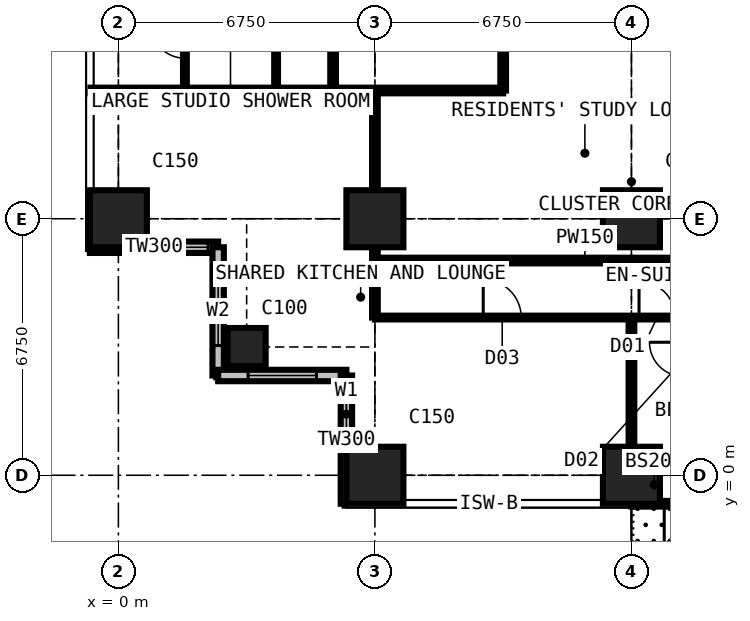
"""IFC4 building model, lengths in metres.
Left out: names, types, materials, properties, quantities, classifications, styles, units other than length and angle.
Written with IfcOpenShell. Run it as: python <this file> out.ifc"""

import sys

from ifc_helpers import new_model, si_unit, direction, frame, frame_2d, origin, origin_2d, place, context, subcontext, project, spatial, rectangle, extrude, element, fill, save


model = new_model("IFC4")
c1 = context("Model", 3, precision=1e-05, world=origin(), true_north=direction((0.0, 1.0)))
c2 = subcontext(c1, "Body", "Model", "MODEL_VIEW")
j1 = project(units=[si_unit("LENGTHUNIT", "METRE"), si_unit("PLANEANGLEUNIT", "RADIAN")], contexts=[c1])
p1 = place(None, origin())
s1 = spatial("IfcSite", under=j1, at=p1, CompositionType="ELEMENT")
p2 = place(p1, origin())
s2 = spatial("IfcBuilding", under=s1, at=p2, CompositionType="ELEMENT")
p3 = place(p2, frame((0.0, 0.0, 123.3)))
s3 = spatial("IfcBuildingStorey", under=s2, at=p3, CompositionType="ELEMENT", Elevation=123.3)
p4 = place(p3, frame((0.0, 6.75, 0.0), z_axis=(0.0, 0.0, 1.0), x_axis=(1.0, 0.0, 0.0)))
e1 = element("IfcColumn", 1, at=p4, inside=s3, PredefinedType="COLUMN", context=c2, shape_type="SweptSolid", body=[
    extrude(rectangle(XDim=1.5, YDim=1.5, at=origin_2d()), origin(), (0.0, 0.0, 1.0), 3.6),
])
p5 = place(p3, frame((3.375, 3.375, 0.0), z_axis=(0.0, 0.0, 1.0), x_axis=(1.0, 0.0, 0.0)))
e2 = element("IfcColumn", 2, at=p5, inside=s3, PredefinedType="COLUMN", context=c2, shape_type="SweptSolid", body=[
    extrude(rectangle(XDim=1.0, YDim=1.0, at=origin_2d()), origin(), (0.0, 0.0, 1.0), 3.6),
])
for number, where, z_axis, x_axis in (
    (3, (6.75, 0.0, 0.0), (0.0, 0.0, 1.0), (1.0, 0.0, 0.0)),
    (4, (6.75, 6.75, 0.0), (0.0, 0.0, 1.0), (1.0, 0.0, 0.0)),
    (5, (13.5, 0.0, 0.0), (0.0, 0.0, 1.0), (1.0, 0.0, 0.0)),
    (6, (13.5, 6.75, 0.0), (0.0, 0.0, 1.0), (1.0, 0.0, 0.0)),
):
    element("IfcColumn", number, at=place(p3, frame(where, z_axis=z_axis, x_axis=x_axis)), inside=s3, PredefinedType="COLUMN", context=c2, shape_type="SweptSolid", body=[
        extrude(rectangle(XDim=1.5, YDim=1.5, at=origin_2d()), origin(), (0.0, 0.0, 1.0), 3.6),
    ])
p6 = place(p3, frame((-0.75, 6.0, 0.0), z_axis=(0.0, 0.0, 1.0), x_axis=(1.0, 0.0, 0.0)))
e7 = element("IfcWall", 7, at=p6, inside=s3, PredefinedType="SOLIDWALL", context=c2, shape_type="SweptSolid", body=[
    extrude(rectangle(XDim=3.375, YDim=0.3, at=frame_2d((1.688, 0.0))), origin(), (0.0, 0.0, 1.0), 3.375),
])
p7 = place(p6, frame((1.607, 0.0, 0.9)))
e8 = element("IfcOpeningElement", 8, at=p7, cuts=e7, PredefinedType="OPENING", context=c2, shape_type="SweptSolid", body=[
    extrude(rectangle(XDim=1.5, YDim=1.8, at=frame_2d((0.75, 0.9))), frame((0.0, 0.16, 0.0), z_axis=(0.0, -1.0, 0.0), x_axis=(1.0, 0.0, 0.0)), (0.0, 0.0, 1.0), 0.32),
])
p8 = place(p3, frame((2.625, 6.0, 0.0), z_axis=(0.0, 0.0, 1.0), x_axis=(0.0, -1.0, 0.0)))
e9 = element("IfcWall", 9, at=p8, inside=s3, PredefinedType="SOLIDWALL", context=c2, shape_type="SweptSolid", body=[
    extrude(rectangle(XDim=3.375, YDim=0.3, at=frame_2d((1.688, 0.0))), origin(), (0.0, 0.0, 1.0), 3.375),
])
p9 = place(p8, frame((0.788, 0.0, 0.6)))
e10 = element("IfcOpeningElement", 10, at=p9, cuts=e9, PredefinedType="OPENING", context=c2, shape_type="SweptSolid", body=[
    extrude(rectangle(XDim=1.8, YDim=2.1, at=frame_2d((0.9, 1.05))), frame((0.0, 0.16, 0.0), z_axis=(0.0, -1.0, 0.0), x_axis=(1.0, 0.0, 0.0)), (0.0, 0.0, 1.0), 0.32),
])
p10 = place(p3, frame((2.625, 2.625, 0.0), z_axis=(0.0, 0.0, 1.0), x_axis=(1.0, 0.0, 0.0)))
e11 = element("IfcWall", 11, at=p10, inside=s3, PredefinedType="SOLIDWALL", context=c2, shape_type="SweptSolid", body=[
    extrude(rectangle(XDim=3.375, YDim=0.3, at=frame_2d((1.688, 0.0))), origin(), (0.0, 0.0, 1.0), 3.375),
])
p11 = place(p10, frame((0.788, 0.0, 0.6)))
e12 = element("IfcOpeningElement", 12, at=p11, cuts=e11, PredefinedType="OPENING", context=c2, shape_type="SweptSolid", body=[
    extrude(rectangle(XDim=1.8, YDim=2.1, at=frame_2d((0.9, 1.05))), frame((0.0, 0.16, 0.0), z_axis=(0.0, -1.0, 0.0), x_axis=(1.0, 0.0, 0.0)), (0.0, 0.0, 1.0), 0.32),
])
p12 = place(p3, frame((6.0, 2.625, 0.0), z_axis=(0.0, 0.0, 1.0), x_axis=(0.0, -1.0, 0.0)))
e13 = element("IfcWall", 13, at=p12, inside=s3, PredefinedType="SOLIDWALL", context=c2, shape_type="SweptSolid", body=[
    extrude(rectangle(XDim=3.375, YDim=0.3, at=frame_2d((1.688, 0.0))), origin(), (0.0, 0.0, 1.0), 3.375),
])
p13 = place(p12, frame((0.268, 0.0, 0.9)))
e14 = element("IfcOpeningElement", 14, at=p13, cuts=e13, PredefinedType="OPENING", context=c2, shape_type="SweptSolid", body=[
    extrude(rectangle(XDim=1.5, YDim=1.8, at=frame_2d((0.75, 0.9))), frame((0.0, 0.16, 0.0), z_axis=(0.0, -1.0, 0.0), x_axis=(1.0, 0.0, 0.0)), (0.0, 0.0, 1.0), 0.32),
])
p14 = place(p3, frame((20.25, -0.75, 0.0), z_axis=(0.0, 0.0, 1.0), x_axis=(-1.0, 0.0, 0.0)))
e15 = element("IfcWall", 15, at=p14, inside=s3, PredefinedType="SOLIDWALL", context=c2, shape_type="SweptSolid", body=[
    extrude(rectangle(XDim=6.75, YDim=0.15, at=frame_2d((3.375, 0.0))), origin(), (0.0, 0.0, 1.0), 3.375),
])
p15 = place(p14, frame((0.863, 0.0, 0.0)))
e16 = element("IfcOpeningElement", 16, at=p15, cuts=e15, PredefinedType="OPENING", context=c2, shape_type="SweptSolid", body=[
    extrude(rectangle(XDim=1.0, YDim=2.2, at=frame_2d((0.5, 1.1))), frame((0.0, 0.085, 0.0), z_axis=(0.0, -1.0, 0.0), x_axis=(1.0, 0.0, 0.0)), (0.0, 0.0, 1.0), 0.17),
])
p16 = place(p14, frame((1.975, 0.0, 0.9)))
e17 = element("IfcOpeningElement", 17, at=p16, cuts=e15, PredefinedType="OPENING", context=c2, shape_type="SweptSolid", body=[
    extrude(rectangle(XDim=1.2, YDim=1.8, at=frame_2d((0.6, 0.9))), frame((0.0, 0.085, 0.0), z_axis=(0.0, -1.0, 0.0), x_axis=(1.0, 0.0, 0.0)), (0.0, 0.0, 1.0), 0.17),
])
p17 = place(p14, frame((4.887, 0.0, 0.0)))
e18 = element("IfcOpeningElement", 18, at=p17, cuts=e15, PredefinedType="OPENING", context=c2, shape_type="SweptSolid", body=[
    extrude(rectangle(XDim=1.0, YDim=2.2, at=frame_2d((0.5, 1.1))), frame((0.0, 0.085, 0.0), z_axis=(0.0, -1.0, 0.0), x_axis=(1.0, 0.0, 0.0)), (0.0, 0.0, 1.0), 0.17),
])
p18 = place(p14, frame((3.575, 0.0, 0.9)))
e19 = element("IfcOpeningElement", 19, at=p18, cuts=e15, PredefinedType="OPENING", context=c2, shape_type="SweptSolid", body=[
    extrude(rectangle(XDim=1.2, YDim=1.8, at=frame_2d((0.6, 0.9))), frame((0.0, 0.085, 0.0), z_axis=(0.0, -1.0, 0.0), x_axis=(1.0, 0.0, 0.0)), (0.0, 0.0, 1.0), 0.17),
])
p19 = place(p3, frame((-0.734, 10.125, 0.0), z_axis=(0.0, 0.0, 1.0), x_axis=(1.0, 0.0, 0.0)))
e20 = element("IfcWall", 20, at=p19, inside=s3, PredefinedType="PARTITIONING", context=c2, shape_type="SweptSolid", body=[
    extrude(rectangle(XDim=10.859, YDim=0.15, at=frame_2d((5.429, 0.0))), origin(), (0.0, 0.0, 1.0), 3.375),
])
p20 = place(p3, frame((1.75, 10.125, 0.0), z_axis=(0.0, 0.0, 1.0), x_axis=(0.0, 1.0, 0.0)))
e21 = element("IfcWall", 21, at=p20, inside=s3, PredefinedType="PARTITIONING", context=c2, shape_type="SweptSolid", body=[
    extrude(rectangle(XDim=2.6, YDim=0.1, at=frame_2d((1.3, 0.0))), origin(), (0.0, 0.0, 1.0), 3.375),
])
p21 = place(p20, frame((0.85, 0.0, 0.0)))
e22 = element("IfcOpeningElement", 22, at=p21, cuts=e21, PredefinedType="OPENING", context=c2, shape_type="SweptSolid", body=[
    extrude(rectangle(XDim=0.9, YDim=2.2, at=frame_2d((0.45, 1.1))), frame((0.0, 0.06, 0.0), z_axis=(0.0, -1.0, 0.0), x_axis=(1.0, 0.0, 0.0)), (0.0, 0.0, 1.0), 0.12),
])
p22 = place(p3, frame((4.15, 10.125, 0.0), z_axis=(0.0, 0.0, 1.0), x_axis=(0.0, 1.0, 0.0)))
e23 = element("IfcWall", 23, at=p22, inside=s3, PredefinedType="PARTITIONING", context=c2, shape_type="SweptSolid", body=[
    extrude(rectangle(XDim=16.875, YDim=0.1, at=frame_2d((8.438, 0.0))), origin(), (0.0, 0.0, 1.0), 3.375),
])
p23 = place(p22, frame((4.2, 0.0, 0.0)))
e24 = element("IfcOpeningElement", 24, at=p23, cuts=e23, PredefinedType="OPENING", context=c2, shape_type="SweptSolid", body=[
    extrude(rectangle(XDim=0.95, YDim=2.2, at=frame_2d((0.475, 1.1))), frame((0.0, 0.06, 0.0), z_axis=(0.0, -1.0, 0.0), x_axis=(1.0, 0.0, 0.0)), (0.0, 0.0, 1.0), 0.12),
])
p24 = place(p22, frame((10.95, 0.0, 0.0)))
e25 = element("IfcOpeningElement", 25, at=p24, cuts=e23, PredefinedType="OPENING", context=c2, shape_type="SweptSolid", body=[
    extrude(rectangle(XDim=0.95, YDim=2.2, at=frame_2d((0.475, 1.1))), frame((0.0, 0.06, 0.0), z_axis=(0.0, -1.0, 0.0), x_axis=(1.0, 0.0, 0.0)), (0.0, 0.0, 1.0), 0.12),
])
p25 = place(p3, frame((5.65, 10.125, 0.0), z_axis=(0.0, 0.0, 1.0), x_axis=(0.0, 1.0, 0.0)))
e26 = element("IfcWall", 26, at=p25, inside=s3, PredefinedType="PARTITIONING", context=c2, shape_type="SweptSolid", body=[
    extrude(rectangle(XDim=10.762, YDim=0.15, at=frame_2d((5.381, 0.0))), origin(), (0.0, 0.0, 1.0), 3.375),
])
p26 = place(p25, frame((4.9, 0.0, 0.0)))
e27 = element("IfcOpeningElement", 27, at=p26, cuts=e26, PredefinedType="OPENING", context=c2, shape_type="SweptSolid", body=[
    extrude(rectangle(XDim=0.95, YDim=2.2, at=frame_2d((0.475, 1.1))), frame((0.0, 0.085, 0.0), z_axis=(0.0, -1.0, 0.0), x_axis=(1.0, 0.0, 0.0)), (0.0, 0.0, 1.0), 0.17),
])
p27 = place(p3, frame((6.75, 4.15, 0.0), z_axis=(0.0, 0.0, 1.0), x_axis=(0.0, 1.0, 0.0)))
e28 = element("IfcWall", 28, at=p27, inside=s3, PredefinedType="PARTITIONING", context=c2, shape_type="SweptSolid", body=[
    extrude(rectangle(XDim=5.975, YDim=0.15, at=frame_2d((2.988, 0.0))), origin(), (0.0, 0.0, 1.0), 2.877),
])
p28 = place(p3, frame((6.75, 4.15, 0.0), z_axis=(0.0, 0.0, 1.0), x_axis=(1.0, 0.0, 0.0)))
e29 = element("IfcWall", 29, at=p28, inside=s3, PredefinedType="PARTITIONING", context=c2, shape_type="SweptSolid", body=[
    extrude(rectangle(XDim=23.625, YDim=0.1, at=frame_2d((11.812, 0.0))), origin(), (0.0, 0.0, 1.0), 3.375),
])
p29 = place(p28, frame((2.85, 0.0, 0.0)))
e30 = element("IfcOpeningElement", 30, at=p29, cuts=e29, PredefinedType="OPENING", context=c2, shape_type="SweptSolid", body=[
    extrude(rectangle(XDim=1.0, YDim=2.2, at=frame_2d((0.5, 1.1))), frame((0.0, 0.06, 0.0), z_axis=(0.0, -1.0, 0.0), x_axis=(1.0, 0.0, 0.0)), (0.0, 0.0, 1.0), 0.12),
])
p30 = place(p28, frame((6.95, 0.0, 0.0)))
e31 = element("IfcOpeningElement", 31, at=p30, cuts=e29, PredefinedType="OPENING", context=c2, shape_type="SweptSolid", body=[
    extrude(rectangle(XDim=0.95, YDim=2.2, at=frame_2d((0.475, 1.1))), frame((0.0, 0.06, 0.0), z_axis=(0.0, -1.0, 0.0), x_axis=(1.0, 0.0, 0.0)), (0.0, 0.0, 1.0), 0.12),
])
p31 = place(p28, frame((10.375, 0.0, 0.0)))
e32 = element("IfcOpeningElement", 32, at=p31, cuts=e29, PredefinedType="OPENING", context=c2, shape_type="SweptSolid", body=[
    extrude(rectangle(XDim=0.95, YDim=2.2, at=frame_2d((0.475, 1.1))), frame((0.0, 0.06, 0.0), z_axis=(0.0, -1.0, 0.0), x_axis=(1.0, 0.0, 0.0)), (0.0, 0.0, 1.0), 0.12),
])
p32 = place(p28, frame((13.7, 0.0, 0.0)))
e33 = element("IfcOpeningElement", 33, at=p32, cuts=e29, PredefinedType="OPENING", context=c2, shape_type="SweptSolid", body=[
    extrude(rectangle(XDim=0.95, YDim=2.2, at=frame_2d((0.475, 1.1))), frame((0.0, 0.06, 0.0), z_axis=(0.0, -1.0, 0.0), x_axis=(1.0, 0.0, 0.0)), (0.0, 0.0, 1.0), 0.12),
])
p33 = place(p28, frame((17.125, 0.0, 0.0)))
e34 = element("IfcOpeningElement", 34, at=p33, cuts=e29, PredefinedType="OPENING", context=c2, shape_type="SweptSolid", body=[
    extrude(rectangle(XDim=0.95, YDim=2.2, at=frame_2d((0.475, 1.1))), frame((0.0, 0.06, 0.0), z_axis=(0.0, -1.0, 0.0), x_axis=(1.0, 0.0, 0.0)), (0.0, 0.0, 1.0), 0.12),
])
p34 = place(p28, frame((20.5, 0.0, 0.0)))
e35 = element("IfcOpeningElement", 35, at=p34, cuts=e29, PredefinedType="OPENING", context=c2, shape_type="SweptSolid", body=[
    extrude(rectangle(XDim=0.95, YDim=2.2, at=frame_2d((0.475, 1.1))), frame((0.0, 0.06, 0.0), z_axis=(0.0, -1.0, 0.0), x_axis=(1.0, 0.0, 0.0)), (0.0, 0.0, 1.0), 0.12),
])
p35 = place(p3, frame((6.75, 5.65, 0.0), z_axis=(0.0, 0.0, 1.0), x_axis=(1.0, 0.0, 0.0)))
e36 = element("IfcWall", 36, at=p35, inside=s3, PredefinedType="PARTITIONING", context=c2, shape_type="SweptSolid", body=[
    extrude(rectangle(XDim=11.05, YDim=0.15, at=frame_2d((5.525, 0.0))), origin(), (0.0, 0.0, 1.0), 3.375),
])
p36 = place(p3, frame((10.125, 10.125, 0.0), z_axis=(0.0, 0.0, 1.0), x_axis=(0.0, 1.0, 0.0)))
e37 = element("IfcWall", 37, at=p36, inside=s3, PredefinedType="PARTITIONING", context=c2, shape_type="SweptSolid", body=[
    extrude(rectangle(XDim=1.175, YDim=0.15, at=frame_2d((0.587, 0.0))), origin(), (0.0, 0.0, 1.0), 3.375),
])
p37 = place(p3, frame((13.5, -0.734, 0.0), z_axis=(0.0, 0.0, 1.0), x_axis=(0.0, 1.0, 0.0)))
e38 = element("IfcWall", 38, at=p37, inside=s3, PredefinedType="PARTITIONING", context=c2, shape_type="SweptSolid", body=[
    extrude(rectangle(XDim=4.884, YDim=0.15, at=frame_2d((2.442, 0.0))), origin(), (0.0, 0.0, 1.0), 2.877),
])
p38 = place(p7, origin())
e39 = element("IfcWindow", 39, at=p38, inside=s3, PartitioningType="SINGLE_PANEL", PredefinedType="WINDOW", context=c2, shape_type="SweptSolid", body=[
    extrude(rectangle(XDim=1.5, YDim=1.8, at=frame_2d((0.75, 0.9))), frame((0.0, 0.03, 0.0), z_axis=(0.0, -1.0, 0.0), x_axis=(1.0, 0.0, 0.0)), (0.0, 0.0, 1.0), 0.06),
])
fill(e8, e39)
p39 = place(p9, origin())
e40 = element("IfcWindow", 40, at=p39, inside=s3, PartitioningType="SINGLE_PANEL", PredefinedType="WINDOW", context=c2, shape_type="SweptSolid", body=[
    extrude(rectangle(XDim=1.8, YDim=2.1, at=frame_2d((0.9, 1.05))), frame((0.0, 0.03, 0.0), z_axis=(0.0, -1.0, 0.0), x_axis=(1.0, 0.0, 0.0)), (0.0, 0.0, 1.0), 0.06),
])
fill(e10, e40)
p40 = place(p11, origin())
e41 = element("IfcWindow", 41, at=p40, inside=s3, PartitioningType="SINGLE_PANEL", PredefinedType="WINDOW", context=c2, shape_type="SweptSolid", body=[
    extrude(rectangle(XDim=1.8, YDim=2.1, at=frame_2d((0.9, 1.05))), frame((0.0, 0.03, 0.0), z_axis=(0.0, -1.0, 0.0), x_axis=(1.0, 0.0, 0.0)), (0.0, 0.0, 1.0), 0.06),
])
fill(e12, e41)
p41 = place(p13, origin())
e42 = element("IfcWindow", 42, at=p41, inside=s3, PartitioningType="SINGLE_PANEL", PredefinedType="WINDOW", context=c2, shape_type="SweptSolid", body=[
    extrude(rectangle(XDim=1.5, YDim=1.8, at=frame_2d((0.75, 0.9))), frame((0.0, 0.03, 0.0), z_axis=(0.0, -1.0, 0.0), x_axis=(1.0, 0.0, 0.0)), (0.0, 0.0, 1.0), 0.06),
])
fill(e14, e42)
p42 = place(p17, origin())
e43 = element("IfcDoor", 43, at=p42, inside=s3, OperationType="SINGLE_SWING_RIGHT", PredefinedType="DOOR", context=c2, shape_type="SweptSolid", body=[
    extrude(rectangle(XDim=1.0, YDim=2.2, at=frame_2d((0.5, 1.1))), frame((0.0, 0.025, 0.0), z_axis=(0.0, -1.0, 0.0), x_axis=(1.0, 0.0, 0.0)), (0.0, 0.0, 1.0), 0.05),
])
fill(e18, e43)
p43 = place(p29, origin())
e44 = element("IfcDoor", 44, at=p43, inside=s3, OperationType="SINGLE_SWING_LEFT", PredefinedType="DOOR", context=c2, shape_type="SweptSolid", body=[
    extrude(rectangle(XDim=1.0, YDim=2.2, at=frame_2d((0.5, 1.1))), frame((0.0, 0.025, 0.0), z_axis=(0.0, -1.0, 0.0), x_axis=(1.0, 0.0, 0.0)), (0.0, 0.0, 1.0), 0.05),
])
fill(e30, e44)
p44 = place(p30, origin())
e45 = element("IfcDoor", 45, at=p44, inside=s3, OperationType="SINGLE_SWING_LEFT", PredefinedType="DOOR", context=c2, shape_type="SweptSolid", body=[
    extrude(rectangle(XDim=0.95, YDim=2.2, at=frame_2d((0.475, 1.1))), frame((0.0, 0.025, 0.0), z_axis=(0.0, -1.0, 0.0), x_axis=(1.0, 0.0, 0.0)), (0.0, 0.0, 1.0), 0.05),
])
fill(e31, e45)
p45 = place(p21, origin())
e46 = element("IfcDoor", 46, at=p45, inside=s3, OperationType="SINGLE_SWING_RIGHT", PredefinedType="DOOR", context=c2, shape_type="SweptSolid", body=[
    extrude(rectangle(XDim=0.9, YDim=2.2, at=frame_2d((0.45, 1.1))), frame((0.0, 0.025, 0.0), z_axis=(0.0, -1.0, 0.0), x_axis=(1.0, 0.0, 0.0)), (0.0, 0.0, 1.0), 0.05),
])
fill(e22, e46)
save(model, sys.argv[1])
